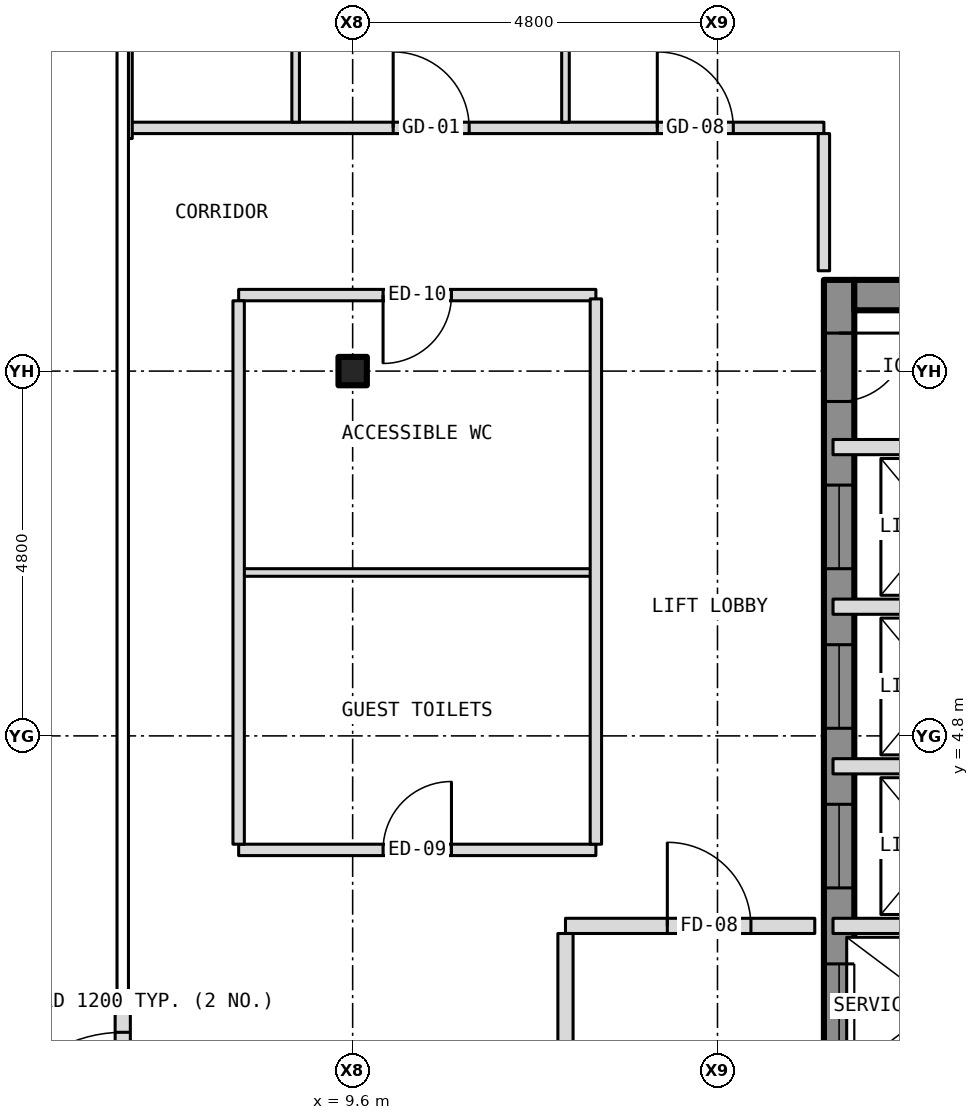
"""IFC4 building model, lengths in metres.
Left out: names, types, materials, properties, quantities, classifications, styles, units other than length and angle.
Written with IfcOpenShell. Run it as: python <this file> out.ifc"""

import sys

from ifc_helpers import new_model, si_unit, direction, frame, frame_2d, origin, origin_2d, place, context, subcontext, project, spatial, rectangle, i_section, extrude, element, fill, save


model = new_model("IFC4")
c1 = context("Model", 3, precision=1e-05, world=origin(), true_north=direction((0.0, 1.0)))
c2 = subcontext(c1, "Body", "Model", "MODEL_VIEW")
j1 = project(units=[si_unit("LENGTHUNIT", "METRE"), si_unit("PLANEANGLEUNIT", "RADIAN")], contexts=[c1])
p1 = place(None, origin())
s1 = spatial("IfcSite", under=j1, at=p1, CompositionType="ELEMENT")
p2 = place(p1, origin())
s2 = spatial("IfcBuilding", under=s1, at=p2, CompositionType="ELEMENT")
p3 = place(p2, frame((0.0, 0.0, 222.5)))
s3 = spatial("IfcBuildingStorey", under=s2, at=p3, CompositionType="ELEMENT", Elevation=222.5)
p4 = place(p3, frame((9.6, 9.6, -0.15), z_axis=(0.0, 0.0, 1.0), x_axis=(1.0, 0.0, 0.0)))
e1 = element("IfcColumn", 1, at=p4, inside=s3, PredefinedType="COLUMN", context=c2, shape_type="SweptSolid", body=[
    extrude(i_section(OverallWidth=0.373, OverallDepth=0.373, WebThickness=0.016, FlangeThickness=0.026, at=origin_2d()), origin(), (0.0, 0.0, 1.0), 3.5),
])
p5 = place(p3, frame((16.0, -10.8, 0.0), z_axis=(0.0, 0.0, 1.0), x_axis=(0.0, 1.0, 0.0)))
e2 = element("IfcWall", 2, at=p5, inside=s3, PredefinedType="SHEAR", context=c2, shape_type="SweptSolid", body=[
    extrude(rectangle(XDim=21.6, YDim=0.4, at=frame_2d((10.8, 0.0))), origin(), (0.0, 0.0, 1.0), 3.25),
])
p6 = place(p5, frame((9.4, 0.0, 0.0)))
e3 = element("IfcOpeningElement", 3, at=p6, cuts=e2, PredefinedType="OPENING", context=c2, shape_type="SweptSolid", body=[
    extrude(rectangle(XDim=1.1, YDim=2.1, at=frame_2d((0.55, 1.05))), frame((0.0, 0.212, 0.0), z_axis=(0.0, -1.0, 0.0), x_axis=(1.0, 0.0, 0.0)), (0.0, 0.0, 1.0), 0.424),
])
p7 = place(p5, frame((11.5, 0.0, 0.0)))
e4 = element("IfcOpeningElement", 4, at=p7, cuts=e2, PredefinedType="OPENING", context=c2, shape_type="SweptSolid", body=[
    extrude(rectangle(XDim=1.1, YDim=2.1, at=frame_2d((0.55, 1.05))), frame((0.0, 0.212, 0.0), z_axis=(0.0, -1.0, 0.0), x_axis=(1.0, 0.0, 0.0)), (0.0, 0.0, 1.0), 0.424),
])
p8 = place(p5, frame((13.6, 0.0, 0.0)))
e5 = element("IfcOpeningElement", 5, at=p8, cuts=e2, PredefinedType="OPENING", context=c2, shape_type="SweptSolid", body=[
    extrude(rectangle(XDim=1.1, YDim=2.1, at=frame_2d((0.55, 1.05))), frame((0.0, 0.212, 0.0), z_axis=(0.0, -1.0, 0.0), x_axis=(1.0, 0.0, 0.0)), (0.0, 0.0, 1.0), 0.424),
])
p9 = place(p5, frame((15.7, 0.0, 0.0)))
e6 = element("IfcOpeningElement", 6, at=p9, cuts=e2, PredefinedType="OPENING", context=c2, shape_type="SweptSolid", body=[
    extrude(rectangle(XDim=1.1, YDim=2.1, at=frame_2d((0.55, 1.05))), frame((0.0, 0.212, 0.0), z_axis=(0.0, -1.0, 0.0), x_axis=(1.0, 0.0, 0.0)), (0.0, 0.0, 1.0), 0.424),
])
p10 = place(p5, frame((17.8, 0.0, 0.0)))
e7 = element("IfcOpeningElement", 7, at=p10, cuts=e2, PredefinedType="OPENING", context=c2, shape_type="SweptSolid", body=[
    extrude(rectangle(XDim=1.1, YDim=2.1, at=frame_2d((0.55, 1.05))), frame((0.0, 0.212, 0.0), z_axis=(0.0, -1.0, 0.0), x_axis=(1.0, 0.0, 0.0)), (0.0, 0.0, 1.0), 0.424),
])
p11 = place(p5, frame((5.642, 0.0, 0.0)))
e8 = element("IfcOpeningElement", 8, at=p11, cuts=e2, PredefinedType="OPENING", context=c2, shape_type="SweptSolid", body=[
    extrude(rectangle(XDim=1.1, YDim=2.1, at=frame_2d((0.55, 1.05))), frame((0.0, 0.212, 0.0), z_axis=(0.0, -1.0, 0.0), x_axis=(1.0, 0.0, 0.0)), (0.0, 0.0, 1.0), 0.424),
])
p12 = place(p5, frame((7.5, 0.0, 0.0)))
e9 = element("IfcOpeningElement", 9, at=p12, cuts=e2, PredefinedType="OPENING", context=c2, shape_type="SweptSolid", body=[
    extrude(rectangle(XDim=1.1, YDim=2.1, at=frame_2d((0.55, 1.05))), frame((0.0, 0.212, 0.0), z_axis=(0.0, -1.0, 0.0), x_axis=(1.0, 0.0, 0.0)), (0.0, 0.0, 1.0), 0.424),
])
p13 = place(p5, frame((20.0, 0.0, 0.0)))
e10 = element("IfcOpeningElement", 10, at=p13, cuts=e2, PredefinedType="OPENING", context=c2, shape_type="SweptSolid", body=[
    extrude(rectangle(XDim=0.9, YDim=2.1, at=frame_2d((0.45, 1.05))), frame((0.0, 0.212, 0.0), z_axis=(0.0, -1.0, 0.0), x_axis=(1.0, 0.0, 0.0)), (0.0, 0.0, 1.0), 0.424),
])
p14 = place(p3, frame((16.2, 10.6, 0.0), z_axis=(0.0, 0.0, 1.0), x_axis=(1.0, 0.0, 0.0)))
e11 = element("IfcWall", 11, at=p14, inside=s3, PredefinedType="SHEAR", context=c2, shape_type="SweptSolid", body=[
    extrude(rectangle(XDim=3.8, YDim=0.4, at=frame_2d((1.9, 0.0))), origin(), (0.0, 0.0, 1.0), 3.25),
])
p15 = place(p3, frame((6.575, -1.4, 0.0), z_axis=(0.0, 0.0, 1.0), x_axis=(0.0, 1.0, 0.0)))
e12 = element("IfcWall", 12, at=p15, inside=s3, PredefinedType="SOLIDWALL", context=c2, shape_type="SweptSolid", body=[
    extrude(rectangle(XDim=2.8, YDim=0.2, at=frame_2d((1.4, 0.0))), origin(), (0.0, 0.0, 1.0), 3.5),
])
p16 = place(p15, frame((0.5, 0.0, 0.0)))
e13 = element("IfcOpeningElement", 13, at=p16, cuts=e12, PredefinedType="OPENING", context=c2, shape_type="SweptSolid", body=[
    extrude(rectangle(XDim=1.8, YDim=2.1, at=frame_2d((0.9, 1.05))), frame((0.0, 0.112, 0.0), z_axis=(0.0, -1.0, 0.0), x_axis=(1.0, 0.0, 0.0)), (0.0, 0.0, 1.0), 0.224),
])
p17 = place(p3, frame((12.4, 2.3, 0.0), z_axis=(0.0, 0.0, 1.0), x_axis=(1.0, 0.0, 0.0)))
e14 = element("IfcWall", 14, at=p17, inside=s3, PredefinedType="PARTITIONING", context=c2, shape_type="SweptSolid", body=[
    extrude(rectangle(XDim=3.28, YDim=0.2, at=frame_2d((1.64, 0.0))), origin(), (0.0, 0.0, 1.0), 3.35),
])
p18 = place(p17, frame((1.34, 0.0, 0.0)))
e15 = element("IfcOpeningElement", 15, at=p18, cuts=e14, PredefinedType="OPENING", context=c2, shape_type="SweptSolid", body=[
    extrude(rectangle(XDim=1.1, YDim=2.1, at=frame_2d((0.55, 1.05))), frame((0.0, 0.112, 0.0), z_axis=(0.0, -1.0, 0.0), x_axis=(1.0, 0.0, 0.0)), (0.0, 0.0, 1.0), 0.224),
])
p19 = place(p3, frame((15.92, 2.3, 0.0), z_axis=(0.0, 0.0, 1.0), x_axis=(1.0, 0.0, 0.0)))
e16 = element("IfcWall", 16, at=p19, inside=s3, PredefinedType="PARTITIONING", context=c2, shape_type="SweptSolid", body=[
    extrude(rectangle(XDim=2.88, YDim=0.2, at=frame_2d((1.44, 0.0))), origin(), (0.0, 0.0, 1.0), 3.25),
])
p20 = place(p3, frame((8.1, 3.3, 0.0), z_axis=(0.0, 0.0, 1.0), x_axis=(1.0, 0.0, 0.0)))
e17 = element("IfcWall", 17, at=p20, inside=s3, PredefinedType="PARTITIONING", context=c2, shape_type="SweptSolid", body=[
    extrude(rectangle(XDim=4.7, YDim=0.15, at=frame_2d((2.35, 0.0))), origin(), (0.0, 0.0, 1.0), 3.35),
])
p21 = place(p20, frame((1.9, 0.0, 0.0)))
e18 = element("IfcOpeningElement", 18, at=p21, cuts=e17, PredefinedType="OPENING", context=c2, shape_type="SweptSolid", body=[
    extrude(rectangle(XDim=0.9, YDim=2.1, at=frame_2d((0.45, 1.05))), frame((0.0, 0.087, 0.0), z_axis=(0.0, -1.0, 0.0), x_axis=(1.0, 0.0, 0.0)), (0.0, 0.0, 1.0), 0.174),
])
for number, where, z_axis, x_axis in (
    (19, (15.92, 4.4, 0.0), (0.0, 0.0, 1.0), (1.0, 0.0, 0.0)),
    (20, (15.92, 6.5, 0.0), (0.0, 0.0, 1.0), (1.0, 0.0, 0.0)),
):
    element("IfcWall", number, at=place(p3, frame(where, z_axis=z_axis, x_axis=x_axis)), inside=s3, PredefinedType="PARTITIONING", context=c2, shape_type="SweptSolid", body=[
        extrude(rectangle(XDim=2.88, YDim=0.2, at=frame_2d((1.44, 0.0))), origin(), (0.0, 0.0, 1.0), 3.25),
    ])
p22 = place(p3, frame((8.1, 6.95, 0.0), z_axis=(0.0, 0.0, 1.0), x_axis=(1.0, 0.0, 0.0)))
e21 = element("IfcWall", 21, at=p22, inside=s3, PredefinedType="PARTITIONING", context=c2, shape_type="SweptSolid", body=[
    extrude(rectangle(XDim=4.7, YDim=0.1, at=frame_2d((2.35, 0.0))), origin(), (0.0, 0.0, 1.0), 3.35),
])
p23 = place(p3, frame((15.92, 8.6, 0.0), z_axis=(0.0, 0.0, 1.0), x_axis=(1.0, 0.0, 0.0)))
e22 = element("IfcWall", 22, at=p23, inside=s3, PredefinedType="PARTITIONING", context=c2, shape_type="SweptSolid", body=[
    extrude(rectangle(XDim=4.36, YDim=0.2, at=frame_2d((2.18, 0.0))), origin(), (0.0, 0.0, 1.0), 3.25),
])
p24 = place(p3, frame((8.1, 10.6, 0.0), z_axis=(0.0, 0.0, 1.0), x_axis=(1.0, 0.0, 0.0)))
e23 = element("IfcWall", 23, at=p24, inside=s3, PredefinedType="PARTITIONING", context=c2, shape_type="SweptSolid", body=[
    extrude(rectangle(XDim=4.7, YDim=0.15, at=frame_2d((2.35, 0.0))), origin(), (0.0, 0.0, 1.0), 3.35),
])
p25 = place(p24, frame((1.9, 0.0, 0.0)))
e24 = element("IfcOpeningElement", 24, at=p25, cuts=e23, PredefinedType="OPENING", context=c2, shape_type="SweptSolid", body=[
    extrude(rectangle(XDim=0.9, YDim=2.1, at=frame_2d((0.45, 1.05))), frame((0.0, 0.087, 0.0), z_axis=(0.0, -1.0, 0.0), x_axis=(1.0, 0.0, 0.0)), (0.0, 0.0, 1.0), 0.174),
])
p26 = place(p3, frame((6.65, 12.8, 0.0), z_axis=(0.0, 0.0, 1.0), x_axis=(1.0, 0.0, 0.0)))
e25 = element("IfcWall", 25, at=p26, inside=s3, PredefinedType="PARTITIONING", context=c2, shape_type="SweptSolid", body=[
    extrude(rectangle(XDim=9.15, YDim=0.15, at=frame_2d((4.575, 0.0))), origin(), (0.0, 0.0, 1.0), 3.35),
])
p27 = place(p26, frame((3.483, 0.0, 0.0)))
e26 = element("IfcOpeningElement", 26, at=p27, cuts=e25, PredefinedType="OPENING", context=c2, shape_type="SweptSolid", body=[
    extrude(rectangle(XDim=1.0, YDim=2.1, at=frame_2d((0.5, 1.05))), frame((0.0, 0.087, 0.0), z_axis=(0.0, -1.0, 0.0), x_axis=(1.0, 0.0, 0.0)), (0.0, 0.0, 1.0), 0.174),
])
p28 = place(p26, frame((6.958, 0.0, 0.0)))
e27 = element("IfcOpeningElement", 27, at=p28, cuts=e25, PredefinedType="OPENING", context=c2, shape_type="SweptSolid", body=[
    extrude(rectangle(XDim=1.0, YDim=2.1, at=frame_2d((0.5, 1.05))), frame((0.0, 0.087, 0.0), z_axis=(0.0, -1.0, 0.0), x_axis=(1.0, 0.0, 0.0)), (0.0, 0.0, 1.0), 0.174),
])
p29 = place(p3, frame((6.65, 12.66, 0.0), z_axis=(0.0, 0.0, 1.0), x_axis=(0.0, 1.0, 0.0)))
e28 = element("IfcWall", 28, at=p29, inside=s3, PredefinedType="PARTITIONING", context=c2, shape_type="SweptSolid", body=[
    extrude(rectangle(XDim=3.48, YDim=0.1, at=frame_2d((1.74, 0.0))), origin(), (0.0, 0.0, 1.0), 3.35),
])
p30 = place(p3, frame((8.1, 3.375, 0.0), z_axis=(0.0, 0.0, 1.0), x_axis=(0.0, 1.0, 0.0)))
e29 = element("IfcWall", 29, at=p30, inside=s3, PredefinedType="PARTITIONING", context=c2, shape_type="SweptSolid", body=[
    extrude(rectangle(XDim=7.15, YDim=0.15, at=frame_2d((3.575, 0.0))), origin(), (0.0, 0.0, 1.0), 3.35),
])
p31 = place(p3, frame((8.85, 12.875, 0.0), z_axis=(0.0, 0.0, 1.0), x_axis=(0.0, 1.0, 0.0)))
e30 = element("IfcWall", 30, at=p31, inside=s3, PredefinedType="PARTITIONING", context=c2, shape_type="SweptSolid", body=[
    extrude(rectangle(XDim=3.075, YDim=0.1, at=frame_2d((1.538, 0.0))), origin(), (0.0, 0.0, 1.0), 3.35),
])
p32 = place(p31, frame((1.971, 0.0, 0.0)))
e31 = element("IfcOpeningElement", 31, at=p32, cuts=e30, PredefinedType="OPENING", context=c2, shape_type="SweptSolid", body=[
    extrude(rectangle(XDim=0.9, YDim=2.1, at=frame_2d((0.45, 1.05))), frame((0.0, 0.062, 0.0), z_axis=(0.0, -1.0, 0.0), x_axis=(1.0, 0.0, 0.0)), (0.0, 0.0, 1.0), 0.124),
])
p33 = place(p3, frame((12.4, -1.8, 0.0), z_axis=(0.0, 0.0, 1.0), x_axis=(0.0, 1.0, 0.0)))
e32 = element("IfcWall", 32, at=p33, inside=s3, PredefinedType="PARTITIONING", context=c2, shape_type="SweptSolid", body=[
    extrude(rectangle(XDim=4.0, YDim=0.2, at=frame_2d((2.0, 0.0))), origin(), (0.0, 0.0, 1.0), 3.35),
])
p34 = place(p33, frame((1.25, 0.0, 0.0)))
e33 = element("IfcOpeningElement", 33, at=p34, cuts=e32, PredefinedType="OPENING", context=c2, shape_type="SweptSolid", body=[
    extrude(rectangle(XDim=1.1, YDim=2.1, at=frame_2d((0.55, 1.05))), frame((0.0, 0.112, 0.0), z_axis=(0.0, -1.0, 0.0), x_axis=(1.0, 0.0, 0.0)), (0.0, 0.0, 1.0), 0.224),
])
p35 = place(p3, frame((12.4, 12.875, 0.0), z_axis=(0.0, 0.0, 1.0), x_axis=(0.0, 1.0, 0.0)))
e34 = element("IfcWall", 34, at=p35, inside=s3, PredefinedType="PARTITIONING", context=c2, shape_type="SweptSolid", body=[
    extrude(rectangle(XDim=7.905, YDim=0.1, at=frame_2d((3.953, 0.0))), origin(), (0.0, 0.0, 1.0), 3.35),
])
p36 = place(p3, frame((12.8, 3.375, 0.0), z_axis=(0.0, 0.0, 1.0), x_axis=(0.0, 1.0, 0.0)))
e35 = element("IfcWall", 35, at=p36, inside=s3, PredefinedType="PARTITIONING", context=c2, shape_type="SweptSolid", body=[
    extrude(rectangle(XDim=7.175, YDim=0.15, at=frame_2d((3.587, 0.0))), origin(), (0.0, 0.0, 1.0), 3.35),
])
p37 = place(p3, frame((15.8, 10.92, 0.0), z_axis=(0.0, 0.0, 1.0), x_axis=(0.0, 1.0, 0.0)))
e36 = element("IfcWall", 36, at=p37, inside=s3, PredefinedType="PARTITIONING", context=c2, shape_type="SweptSolid", body=[
    extrude(rectangle(XDim=1.805, YDim=0.15, at=frame_2d((0.903, 0.0))), origin(), (0.0, 0.0, 1.0), 3.35),
])
p38 = place(p16, origin())
e37 = element("IfcDoor", 37, at=p38, inside=s3, OperationType="DOUBLE_DOOR_DOUBLE_SWING", PredefinedType="DOOR", context=c2, shape_type="SweptSolid", body=[
    extrude(rectangle(XDim=1.8, YDim=2.1, at=frame_2d((0.9, 1.05))), frame((0.0, 0.025, 0.0), z_axis=(0.0, -1.0, 0.0), x_axis=(1.0, 0.0, 0.0)), (0.0, 0.0, 1.0), 0.05),
])
fill(e13, e37)
p39 = place(p7, origin())
e38 = element("IfcDoor", 38, at=p39, inside=s3, OperationType="SLIDING_TO_LEFT", PredefinedType="DOOR", context=c2, shape_type="SweptSolid", body=[
    extrude(rectangle(XDim=1.1, YDim=2.1, at=frame_2d((0.55, 1.05))), frame((0.0, 0.025, 0.0), z_axis=(0.0, -1.0, 0.0), x_axis=(1.0, 0.0, 0.0)), (0.0, 0.0, 1.0), 0.05),
])
fill(e4, e38)
p40 = place(p8, origin())
e39 = element("IfcDoor", 39, at=p40, inside=s3, OperationType="SLIDING_TO_LEFT", PredefinedType="DOOR", context=c2, shape_type="SweptSolid", body=[
    extrude(rectangle(XDim=1.1, YDim=2.1, at=frame_2d((0.55, 1.05))), frame((0.0, 0.025, 0.0), z_axis=(0.0, -1.0, 0.0), x_axis=(1.0, 0.0, 0.0)), (0.0, 0.0, 1.0), 0.05),
])
fill(e5, e39)
p41 = place(p9, origin())
e40 = element("IfcDoor", 40, at=p41, inside=s3, OperationType="SLIDING_TO_LEFT", PredefinedType="DOOR", context=c2, shape_type="SweptSolid", body=[
    extrude(rectangle(XDim=1.1, YDim=2.1, at=frame_2d((0.55, 1.05))), frame((0.0, 0.025, 0.0), z_axis=(0.0, -1.0, 0.0), x_axis=(1.0, 0.0, 0.0)), (0.0, 0.0, 1.0), 0.05),
])
fill(e6, e40)
p42 = place(p10, origin())
e41 = element("IfcDoor", 41, at=p42, inside=s3, OperationType="SLIDING_TO_LEFT", PredefinedType="DOOR", context=c2, shape_type="SweptSolid", body=[
    extrude(rectangle(XDim=1.1, YDim=2.1, at=frame_2d((0.55, 1.05))), frame((0.0, 0.025, 0.0), z_axis=(0.0, -1.0, 0.0), x_axis=(1.0, 0.0, 0.0)), (0.0, 0.0, 1.0), 0.05),
])
fill(e7, e41)
p43 = place(p13, origin())
e42 = element("IfcDoor", 42, at=p43, inside=s3, OperationType="SINGLE_SWING_RIGHT", PredefinedType="DOOR", context=c2, shape_type="SweptSolid", body=[
    extrude(rectangle(XDim=0.9, YDim=2.1, at=frame_2d((0.45, 1.05))), frame((0.0, 0.025, 0.0), z_axis=(0.0, -1.0, 0.0), x_axis=(1.0, 0.0, 0.0)), (0.0, 0.0, 1.0), 0.05),
])
fill(e10, e42)
p44 = place(p18, origin())
e43 = element("IfcDoor", 43, at=p44, inside=s3, OperationType="SINGLE_SWING_LEFT", PredefinedType="DOOR", context=c2, shape_type="SweptSolid", body=[
    extrude(rectangle(XDim=1.1, YDim=2.1, at=frame_2d((0.55, 1.05))), frame((0.0, 0.025, 0.0), z_axis=(0.0, -1.0, 0.0), x_axis=(1.0, 0.0, 0.0)), (0.0, 0.0, 1.0), 0.05),
])
fill(e15, e43)
p45 = place(p27, origin())
e44 = element("IfcDoor", 44, at=p45, inside=s3, OperationType="SINGLE_SWING_LEFT", PredefinedType="DOOR", context=c2, shape_type="SweptSolid", body=[
    extrude(rectangle(XDim=1.0, YDim=2.1, at=frame_2d((0.5, 1.05))), frame((0.0, 0.025, 0.0), z_axis=(0.0, -1.0, 0.0), x_axis=(1.0, 0.0, 0.0)), (0.0, 0.0, 1.0), 0.05),
])
fill(e26, e44)
p46 = place(p28, origin())
e45 = element("IfcDoor", 45, at=p46, inside=s3, OperationType="SINGLE_SWING_LEFT", PredefinedType="DOOR", context=c2, shape_type="SweptSolid", body=[
    extrude(rectangle(XDim=1.0, YDim=2.1, at=frame_2d((0.5, 1.05))), frame((0.0, 0.025, 0.0), z_axis=(0.0, -1.0, 0.0), x_axis=(1.0, 0.0, 0.0)), (0.0, 0.0, 1.0), 0.05),
])
fill(e27, e45)
p47 = place(p21, origin())
e46 = element("IfcDoor", 46, at=p47, inside=s3, OperationType="SINGLE_SWING_RIGHT", PredefinedType="DOOR", context=c2, shape_type="SweptSolid", body=[
    extrude(rectangle(XDim=0.9, YDim=2.1, at=frame_2d((0.45, 1.05))), frame((0.0, 0.025, 0.0), z_axis=(0.0, -1.0, 0.0), x_axis=(1.0, 0.0, 0.0)), (0.0, 0.0, 1.0), 0.05),
])
fill(e18, e46)
p48 = place(p25, origin())
e47 = element("IfcDoor", 47, at=p48, inside=s3, OperationType="SINGLE_SWING_LEFT", PredefinedType="DOOR", context=c2, shape_type="SweptSolid", body=[
    extrude(rectangle(XDim=0.9, YDim=2.1, at=frame_2d((0.45, 1.05))), frame((0.0, 0.025, 0.0), z_axis=(0.0, -1.0, 0.0), x_axis=(1.0, 0.0, 0.0)), (0.0, 0.0, 1.0), 0.05),
])
fill(e24, e47)
save(model, sys.argv[1])
